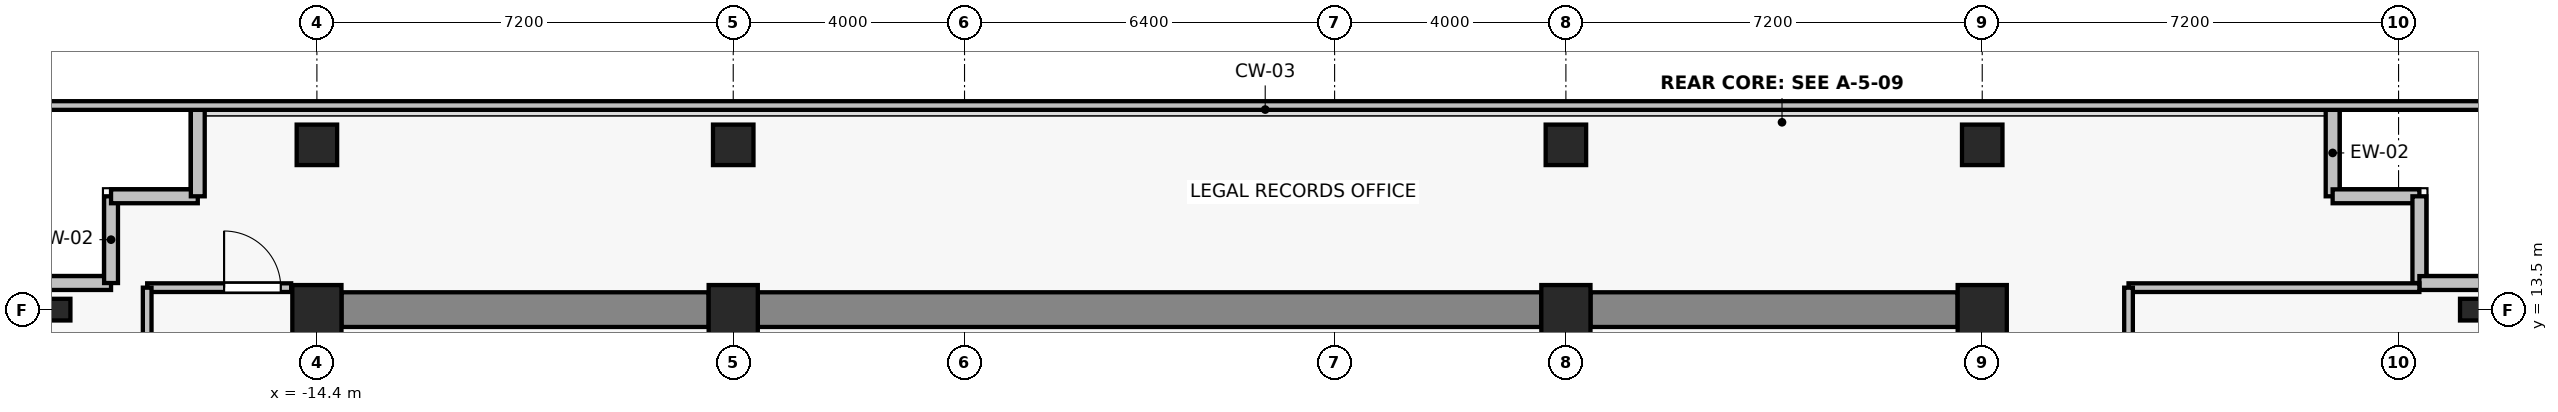
"""IFC4 building model, lengths in metres.
Left out: names, types, materials, properties, quantities, classifications, styles, units other than length and angle.
Written with IfcOpenShell. Run it as: python <this file> out.ifc"""

import sys

from ifc_helpers import new_model, si_unit, direction, frame, frame_2d, origin, origin_2d, place, context, subcontext, project, spatial, rectangle, i_section, extrude, source, transform, mapped, element, fill, save


model = new_model("IFC4")
c1 = context("Model", 3, precision=1e-05, world=origin(), true_north=direction((0.0, 1.0)))
c2 = subcontext(c1, "Body", "Model", "MODEL_VIEW")
j1 = project(units=[si_unit("LENGTHUNIT", "METRE"), si_unit("PLANEANGLEUNIT", "RADIAN")], contexts=[c1])
p1 = place(None, origin())
s1 = spatial("IfcSite", under=j1, at=p1, CompositionType="ELEMENT")
p2 = place(p1, origin())
s2 = spatial("IfcBuilding", under=s1, at=p2, CompositionType="ELEMENT")
p3 = place(p2, frame((0.0, 0.0, 251.8)))
s3 = spatial("IfcBuildingStorey", under=s2, at=p3, CompositionType="ELEMENT", Elevation=251.8)
for number, where, z_axis, x_axis in (
    (1, (-14.4, 13.5, 0.0), (0.0, 0.0, 1.0), (1.0, 0.0, 0.0)),
    (2, (-7.2, 13.5, 0.0), (0.0, 0.0, 1.0), (1.0, 0.0, 0.0)),
    (3, (7.2, 13.5, 0.0), (0.0, 0.0, 1.0), (1.0, 0.0, 0.0)),
    (4, (14.4, 13.5, 0.0), (0.0, 0.0, 1.0), (1.0, 0.0, 0.0)),
):
    element("IfcColumn", number, at=place(p3, frame(where, z_axis=z_axis, x_axis=x_axis)), inside=s3, PredefinedType="COLUMN", context=c2, shape_type="SweptSolid", body=[
        extrude(rectangle(XDim=0.85, YDim=0.85, at=origin_2d()), origin(), (0.0, 0.0, 1.0), 3.3),
    ])
for number, where, z_axis, x_axis in (
    (5, (-14.4, 16.35, 0.0), (0.0, 0.0, 1.0), (1.0, 0.0, 0.0)),
    (6, (-7.2, 16.35, 0.0), (0.0, 0.0, 1.0), (1.0, 0.0, 0.0)),
    (7, (7.2, 16.35, 0.0), (0.0, 0.0, 1.0), (1.0, 0.0, 0.0)),
    (8, (14.4, 16.35, 0.0), (0.0, 0.0, 1.0), (1.0, 0.0, 0.0)),
):
    element("IfcColumn", number, at=place(p3, frame(where, z_axis=z_axis, x_axis=x_axis)), inside=s3, PredefinedType="COLUMN", context=c2, shape_type="SweptSolid", body=[
        extrude(rectangle(XDim=0.7, YDim=0.7, at=origin_2d()), origin(), (0.0, 0.0, 1.0), 3.3),
    ])
for number, where, z_axis, x_axis in (
    (9, (-18.85, 13.5, 0.0), (0.0, 0.0, 1.0), (1.0, 0.0, 0.0)),
    (10, (22.85, 13.5, 0.0), (0.0, 0.0, 1.0), (1.0, 0.0, 0.0)),
):
    element("IfcColumn", number, at=place(p3, frame(where, z_axis=z_axis, x_axis=x_axis)), inside=s3, PredefinedType="COLUMN", context=c2, shape_type="SweptSolid", body=[
        extrude(i_section(OverallWidth=0.375, OverallDepth=0.375, WebThickness=0.017, FlangeThickness=0.027, FilletRadius=0.015, at=origin_2d()), origin(), (0.0, 0.0, 1.0), 3.3),
    ])
p4 = place(p3, frame((-13.975, 13.5, 0.0), z_axis=(0.0, 0.0, 1.0), x_axis=(1.0, 0.0, 0.0)))
e11 = element("IfcWall", 11, at=p4, inside=s3, PredefinedType="SHEAR", context=c2, shape_type="SweptSolid", body=[
    extrude(rectangle(XDim=6.35, YDim=0.6, at=frame_2d((3.175, 0.0))), origin(), (0.0, 0.0, 1.0), 3.075),
])
p5 = place(p3, frame((-6.775, 13.5, 0.0), z_axis=(0.0, 0.0, 1.0), x_axis=(1.0, 0.0, 0.0)))
e12 = element("IfcWall", 12, at=p5, inside=s3, PredefinedType="SHEAR", context=c2, shape_type="SweptSolid", body=[
    extrude(rectangle(XDim=13.55, YDim=0.6, at=frame_2d((6.775, 0.0))), origin(), (0.0, 0.0, 1.0), 3.075),
])
p6 = place(p3, frame((7.625, 13.5, 0.0), z_axis=(0.0, 0.0, 1.0), x_axis=(1.0, 0.0, 0.0)))
e13 = element("IfcWall", 13, at=p6, inside=s3, PredefinedType="SHEAR", context=c2, shape_type="SweptSolid", body=[
    extrude(rectangle(XDim=6.35, YDim=0.6, at=frame_2d((3.175, 0.0))), origin(), (0.0, 0.0, 1.0), 3.075),
])
for number, where, z_axis, x_axis in (
    (14, (-17.96, 13.96, 0.0), (0.0, 0.0, 1.0), (-1.0, 0.0, 0.0)),
    (15, (-17.96, 15.46, 0.0), (0.0, 0.0, 1.0), (0.0, -1.0, 0.0)),
    (16, (-16.46, 15.46, 0.0), (0.0, 0.0, 1.0), (-1.0, 0.0, 0.0)),
    (17, (-16.46, 16.96, 0.0), (0.0, 0.0, 1.0), (0.0, -1.0, 0.0)),
    (18, (20.46, 15.46, 0.0), (0.0, 0.0, 1.0), (0.0, 1.0, 0.0)),
    (19, (21.96, 15.46, 0.0), (0.0, 0.0, 1.0), (-1.0, 0.0, 0.0)),
    (20, (21.96, 13.96, 0.0), (0.0, 0.0, 1.0), (0.0, 1.0, 0.0)),
    (21, (23.46, 13.96, 0.0), (0.0, 0.0, 1.0), (-1.0, 0.0, 0.0)),
):
    element("IfcWall", number, at=place(p3, frame(where, z_axis=z_axis, x_axis=x_axis)), inside=s3, PredefinedType="SOLIDWALL", context=c2, shape_type="SweptSolid", body=[
        extrude(rectangle(XDim=1.5, YDim=0.24, at=frame_2d((0.75, 0.0))), origin(), (0.0, 0.0, 1.0), 3.075),
    ])
p7 = place(p3, frame((-17.335, 13.88, 0.0), z_axis=(0.0, 0.0, 1.0), x_axis=(1.0, 0.0, 0.0)))
e22 = element("IfcWall", 22, at=p7, inside=s3, PredefinedType="PARTITIONING", context=c2, shape_type="SweptSolid", body=[
    extrude(rectangle(XDim=2.49, YDim=0.15, at=frame_2d((1.245, 0.0))), origin(), (0.0, 0.0, 1.0), 3.075),
])
p8 = place(p7, frame((1.33, 0.0, 0.0)))
e23 = element("IfcOpeningElement", 23, at=p8, cuts=e22, PredefinedType="OPENING", context=c2, shape_type="SweptSolid", body=[
    extrude(rectangle(XDim=0.98, YDim=2.15, at=frame_2d((0.49, 1.075))), frame((0.0, 0.085, 0.0), z_axis=(0.0, -1.0, 0.0), x_axis=(1.0, 0.0, 0.0)), (0.0, 0.0, 1.0), 0.17),
])
p9 = place(p3, frame((-17.335, -1.77, 0.0), z_axis=(0.0, 0.0, 1.0), x_axis=(0.0, 1.0, 0.0)))
e24 = element("IfcWall", 24, at=p9, inside=s3, PredefinedType="PARTITIONING", context=c2, shape_type="SweptSolid", body=[
    extrude(rectangle(XDim=15.65, YDim=0.15, at=frame_2d((7.825, 0.0))), origin(), (0.0, 0.0, 1.0), 2.615),
])
p10 = place(p3, frame((16.93, 13.88, 0.0), z_axis=(0.0, 0.0, 1.0), x_axis=(1.0, 0.0, 0.0)))
e25 = element("IfcWall", 25, at=p10, inside=s3, PredefinedType="PARTITIONING", context=c2, shape_type="SweptSolid", body=[
    extrude(rectangle(XDim=5.03, YDim=0.15, at=frame_2d((2.515, 0.0))), origin(), (0.0, 0.0, 1.0), 3.075),
])
p11 = place(p3, frame((16.93, 5.203, 0.0), z_axis=(0.0, 0.0, 1.0), x_axis=(0.0, 1.0, 0.0)))
e26 = element("IfcWall", 26, at=p11, inside=s3, PredefinedType="PARTITIONING", context=c2, shape_type="SweptSolid", body=[
    extrude(rectangle(XDim=8.677, YDim=0.15, at=frame_2d((4.338, 0.0))), origin(), (0.0, 0.0, 1.0), 2.615),
])
p12 = place(p11, frame((3.849, 0.0, 0.0)))
e27 = element("IfcOpeningElement", 27, at=p12, cuts=e26, PredefinedType="OPENING", context=c2, shape_type="SweptSolid", body=[
    extrude(rectangle(XDim=0.98, YDim=2.15, at=frame_2d((0.49, 1.075))), frame((0.0, 0.085, 0.0), z_axis=(0.0, -1.0, 0.0), x_axis=(1.0, 0.0, 0.0)), (0.0, 0.0, 1.0), 0.17),
])
p13 = place(p3, frame((-19.53, 17.03, 0.0), z_axis=(0.0, 0.0, 1.0), x_axis=(1.0, 0.0, 0.0)))
e28 = element("IfcWall", 28, at=p13, inside=s3, PredefinedType="PARTITIONING", context=c2, shape_type="SweptSolid", body=[
    extrude(rectangle(XDim=43.06, YDim=0.15, at=frame_2d((21.53, 0.0))), origin(), (0.0, 0.0, 1.0), 3.075),
])
m1 = source(origin(), c2, "Body", "SweptSolid", [
    extrude(rectangle(XDim=0.98, YDim=2.15, at=frame_2d((0.49, 1.075))), frame((0.0, 0.025, 0.0), z_axis=(0.0, -1.0, 0.0), x_axis=(1.0, 0.0, 0.0)), (0.0, 0.0, 1.0), 0.05),
])
p14 = place(p8, origin())
e29 = element("IfcDoor", 29, at=p14, inside=s3, OperationType="SINGLE_SWING_LEFT", PredefinedType="DOOR", context=c2, shape_type="MappedRepresentation", body=[
    mapped(m1, transform((0.0, 0.0, 0.0), x_axis=(1.0, 0.0, 0.0), y_axis=(0.0, 1.0, 0.0), z_axis=(0.0, 0.0, 1.0), scale=1.0)),
])
fill(e23, e29)
save(model, sys.argv[1])
